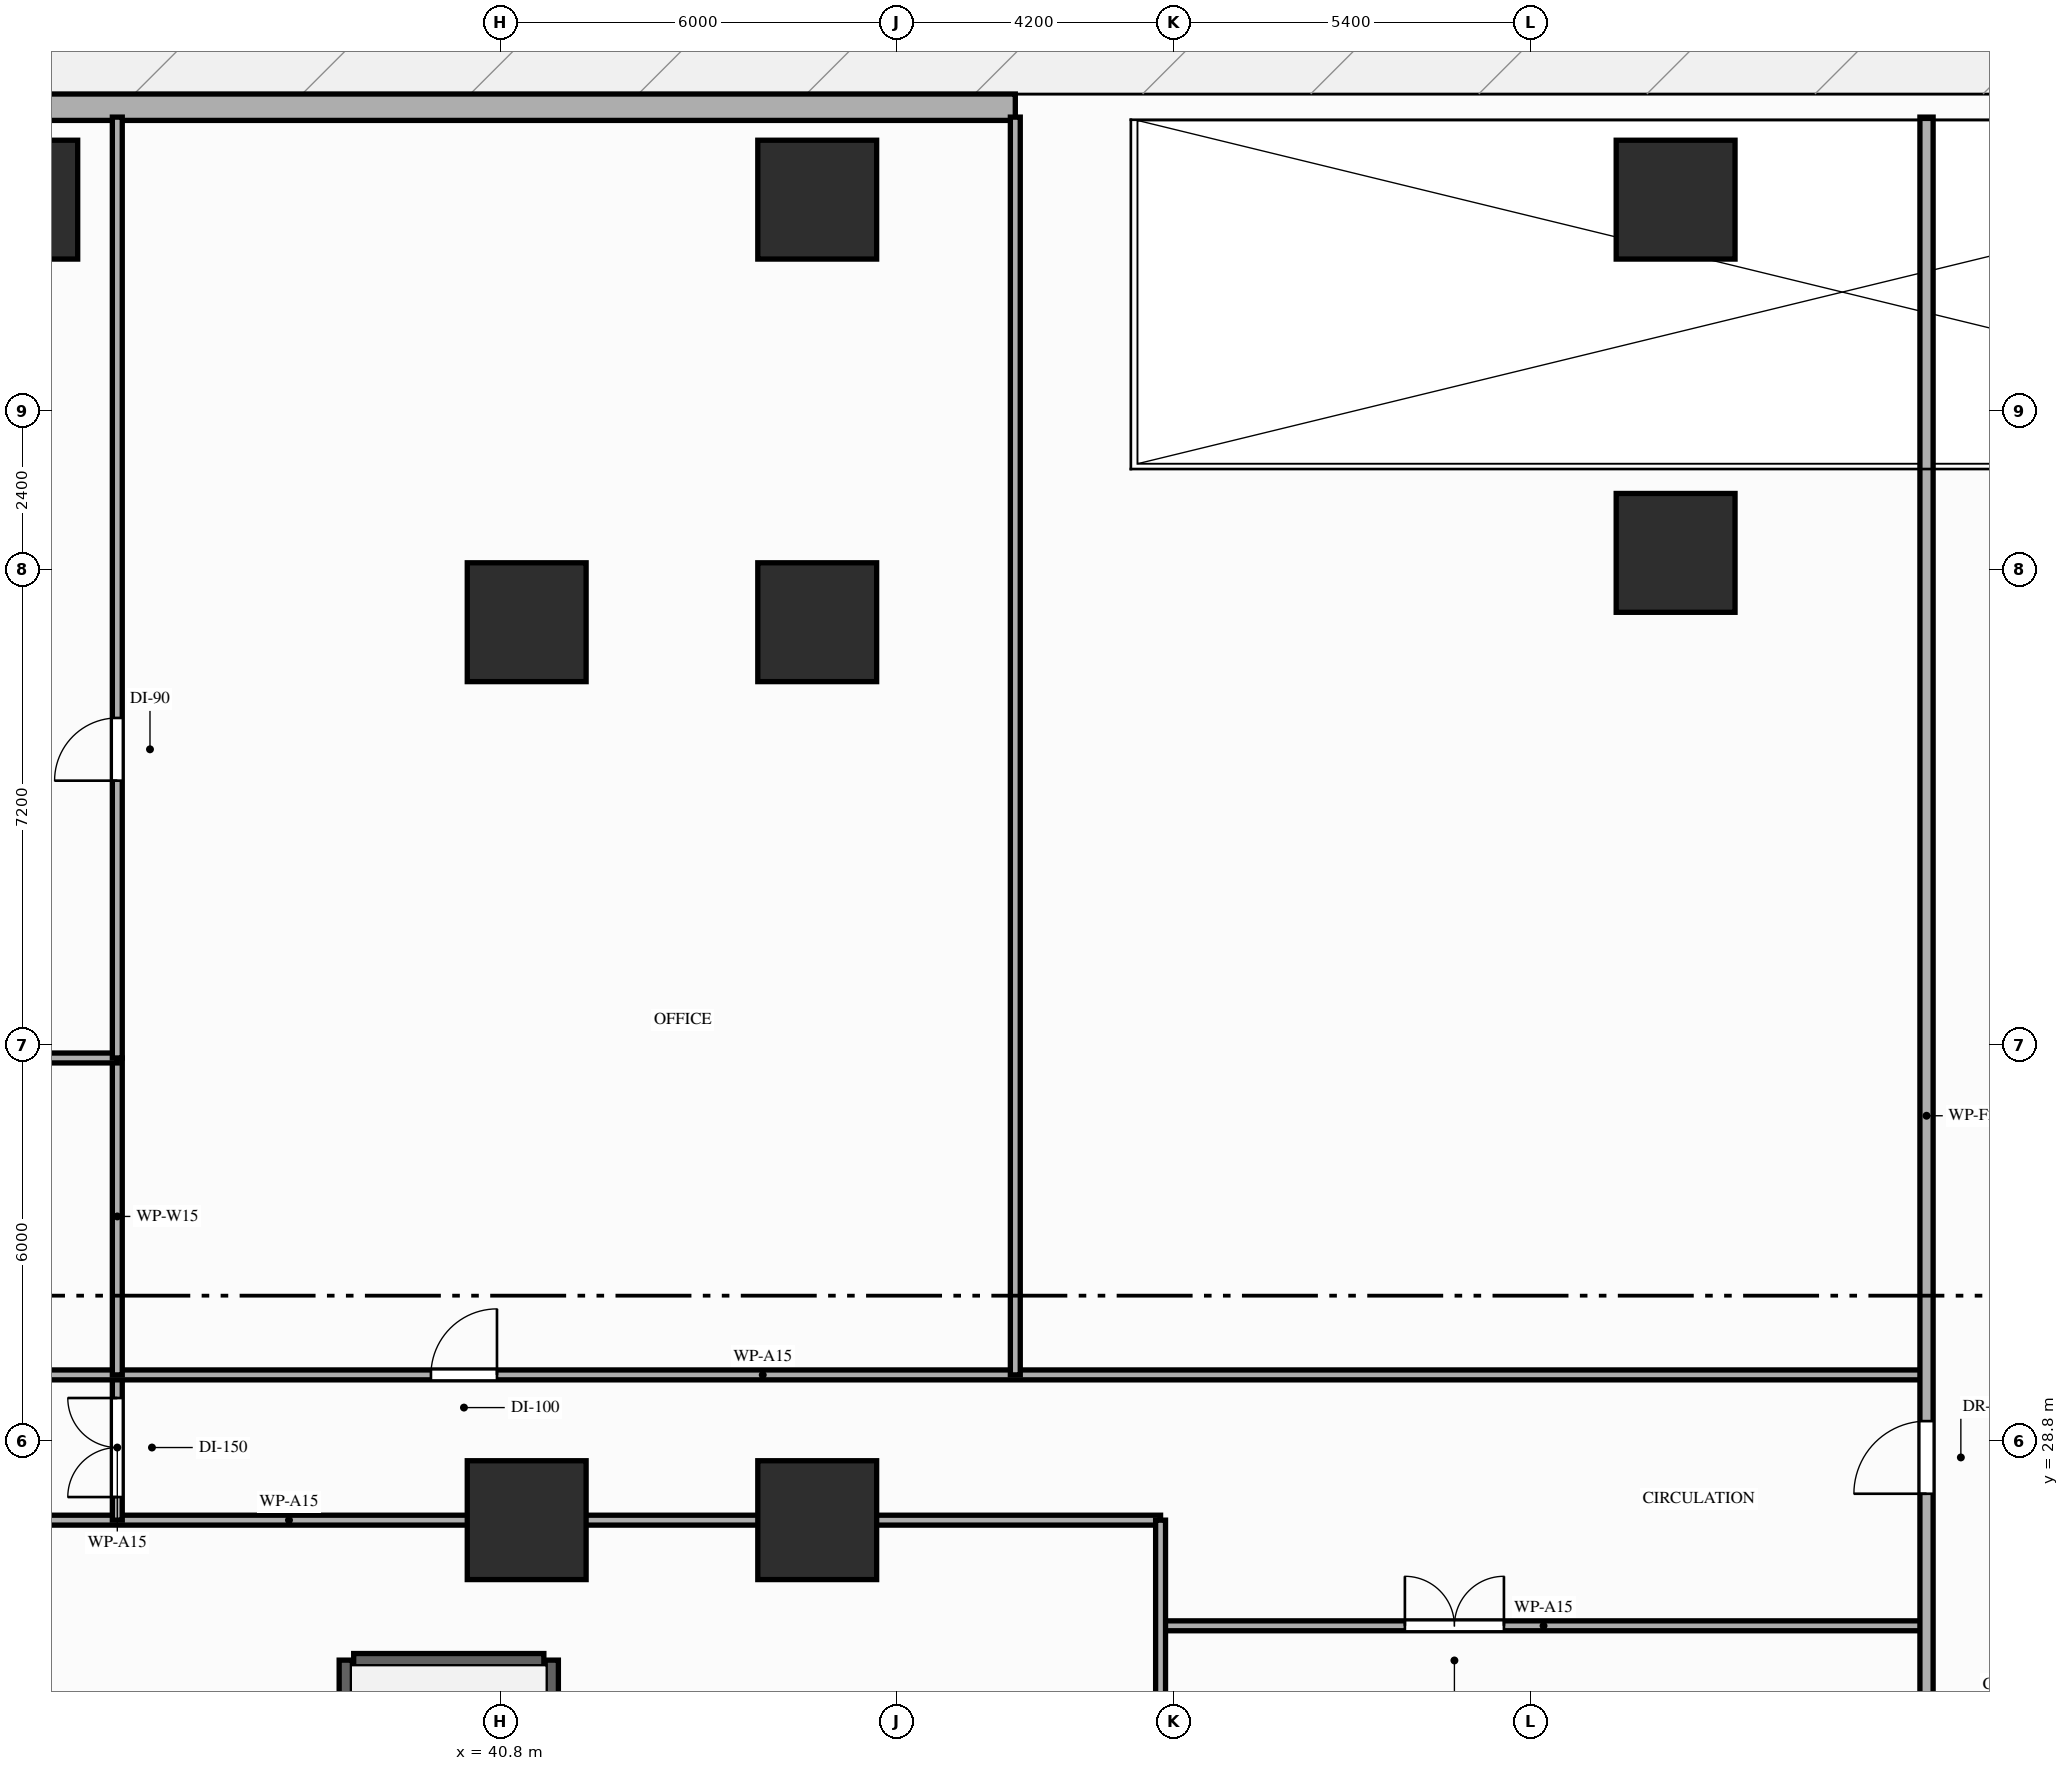
"""IFC4 building model, lengths in metres.
Left out: names, types, materials, properties, quantities, classifications, styles, units other than length and angle.
Written with IfcOpenShell. Run it as: python <this file> out.ifc"""

import sys

from ifc_helpers import new_model, si_unit, direction, frame, frame_2d, origin, origin_2d, place, context, subcontext, project, spatial, rectangle, extrude, element, fill, save


model = new_model("IFC4")
c1 = context("Model", 3, precision=1e-05, world=origin(), true_north=direction((0.0, 1.0)))
c2 = subcontext(c1, "Body", "Model", "MODEL_VIEW")
j1 = project(units=[si_unit("LENGTHUNIT", "METRE"), si_unit("PLANEANGLEUNIT", "RADIAN")], contexts=[c1])
p1 = place(None, origin())
s1 = spatial("IfcSite", under=j1, at=p1, CompositionType="ELEMENT")
p2 = place(p1, origin())
s2 = spatial("IfcBuilding", under=s1, at=p2, CompositionType="ELEMENT")
p3 = place(p2, origin())
s3 = spatial("IfcBuildingStorey", under=s2, at=p3, CompositionType="ELEMENT", Elevation=0.0)
for number, where, z_axis, x_axis in (
    (1, (41.2, 27.6, 0.0), (0.0, 0.0, 1.0), (1.0, 0.0, 0.0)),
    (2, (45.6, 27.6, 0.0), (0.0, 0.0, 1.0), (1.0, 0.0, 0.0)),
    (3, (41.2, 41.2, 0.0), (0.0, 0.0, 1.0), (1.0, 0.0, 0.0)),
    (4, (45.6, 41.2, 0.0), (0.0, 0.0, 1.0), (1.0, 0.0, 0.0)),
    (5, (58.6, 42.25, 0.0), (0.0, 0.0, 1.0), (1.0, 0.0, 0.0)),
    (6, (33.5, 47.6, 0.0), (0.0, 0.0, 1.0), (1.0, 0.0, 0.0)),
    (7, (45.6, 47.6, 0.0), (0.0, 0.0, 1.0), (1.0, 0.0, 0.0)),
    (8, (58.6, 47.6, 0.0), (0.0, 0.0, 1.0), (1.0, 0.0, 0.0)),
):
    element("IfcColumn", number, at=place(p3, frame(where, z_axis=z_axis, x_axis=x_axis)), inside=s3, PredefinedType="COLUMN", context=c2, shape_type="SweptSolid", body=[
        extrude(rectangle(XDim=1.8, YDim=1.8, at=origin_2d()), origin(), (0.0, 0.0, 1.0), 4.6),
    ])
p4 = place(p3, frame((48.6, 49.0, 0.0), z_axis=(0.0, 0.0, 1.0), x_axis=(-1.0, 0.0, 0.0)))
e9 = element("IfcWall", 9, at=p4, inside=s3, PredefinedType="STANDARD", context=c2, shape_type="SweptSolid", body=[
    extrude(rectangle(XDim=45.0, YDim=0.4, at=frame_2d((22.5, 0.0))), origin(), (0.0, 0.0, 1.0), 4.35),
])
p5 = place(p4, frame((18.8, 0.0, 0.9)))
e10 = element("IfcOpeningElement", 10, at=p5, cuts=e9, PredefinedType="OPENING", context=c2, shape_type="SweptSolid", body=[
    extrude(rectangle(XDim=2.4, YDim=2.15, at=frame_2d((1.2, 1.075))), frame((0.0, 0.21, 0.0), z_axis=(0.0, -1.0, 0.0), x_axis=(1.0, 0.0, 0.0)), (0.0, 0.0, 1.0), 0.42),
])
p6 = place(p4, frame((31.0, 0.0, 0.9)))
e11 = element("IfcOpeningElement", 11, at=p6, cuts=e9, PredefinedType="OPENING", context=c2, shape_type="SweptSolid", body=[
    extrude(rectangle(XDim=2.4, YDim=2.15, at=frame_2d((1.2, 1.075))), frame((0.0, 0.21, 0.0), z_axis=(0.0, -1.0, 0.0), x_axis=(1.0, 0.0, 0.0)), (0.0, 0.0, 1.0), 0.42),
])
p7 = place(p3, frame((38.46, 17.52, 0.0), z_axis=(0.0, 0.0, 1.0), x_axis=(0.0, 1.0, 0.0)))
e12 = element("IfcWall", 12, at=p7, inside=s3, PredefinedType="SHEAR", context=c2, shape_type="SweptSolid", body=[
    extrude(rectangle(XDim=7.96, YDim=0.2, at=frame_2d((3.98, 0.0))), origin(), (0.0, 0.0, 1.0), 4.35),
])
p8 = place(p3, frame((41.58, 17.52, 0.0), z_axis=(0.0, 0.0, 1.0), x_axis=(0.0, 1.0, 0.0)))
e13 = element("IfcWall", 13, at=p8, inside=s3, PredefinedType="SHEAR", context=c2, shape_type="SweptSolid", body=[
    extrude(rectangle(XDim=7.96, YDim=0.2, at=frame_2d((3.98, 0.0))), origin(), (0.0, 0.0, 1.0), 4.35),
])
p9 = place(p8, frame((0.22, 0.0, 0.0)))
e14 = element("IfcOpeningElement", 14, at=p9, cuts=e13, PredefinedType="OPENING", context=c2, shape_type="SweptSolid", body=[
    extrude(rectangle(XDim=1.1, YDim=2.15, at=frame_2d((0.55, 1.075))), frame((0.0, 0.11, 0.0), z_axis=(0.0, -1.0, 0.0), x_axis=(1.0, 0.0, 0.0)), (0.0, 0.0, 1.0), 0.22),
])
p10 = place(p3, frame((38.58, 25.48, 0.0), z_axis=(0.0, 0.0, 1.0), x_axis=(1.0, 0.0, 0.0)))
e15 = element("IfcWall", 15, at=p10, inside=s3, PredefinedType="SHEAR", context=c2, shape_type="SweptSolid", body=[
    extrude(rectangle(XDim=2.88, YDim=0.2, at=frame_2d((1.44, 0.0))), origin(), (0.0, 0.0, 1.0), 4.35),
])
p11 = place(p3, frame((24.4, 27.6, 0.0), z_axis=(0.0, 0.0, 1.0), x_axis=(1.0, 0.0, 0.0)))
e16 = element("IfcWall", 16, at=p11, inside=s3, PredefinedType="PARTITIONING", context=c2, shape_type="SweptSolid", body=[
    extrude(rectangle(XDim=26.4, YDim=0.15, at=frame_2d((13.2, 0.0))), origin(), (0.0, 0.0, 1.0), 3.63),
])
p12 = place(p11, frame((7.6, 0.0, 0.0)))
e17 = element("IfcOpeningElement", 17, at=p12, cuts=e16, PredefinedType="OPENING", context=c2, shape_type="SweptSolid", body=[
    extrude(rectangle(XDim=1.5, YDim=2.18, at=frame_2d((0.75, 1.09))), frame((0.0, 0.085, 0.0), z_axis=(0.0, -1.0, 0.0), x_axis=(1.0, 0.0, 0.0)), (0.0, 0.0, 1.0), 0.17),
])
p13 = place(p3, frame((50.8, 26.0, 0.0), z_axis=(0.0, 0.0, 1.0), x_axis=(1.0, 0.0, 0.0)))
e18 = element("IfcWall", 18, at=p13, inside=s3, PredefinedType="PARTITIONING", context=c2, shape_type="SweptSolid", body=[
    extrude(rectangle(XDim=11.6, YDim=0.15, at=frame_2d((5.8, 0.0))), origin(), (0.0, 0.0, 1.0), 3.63),
])
p14 = place(p13, frame((3.7, 0.0, 0.0)))
e19 = element("IfcOpeningElement", 19, at=p14, cuts=e18, PredefinedType="OPENING", context=c2, shape_type="SweptSolid", body=[
    extrude(rectangle(XDim=1.5, YDim=2.18, at=frame_2d((0.75, 1.09))), frame((0.0, 0.085, 0.0), z_axis=(0.0, -1.0, 0.0), x_axis=(1.0, 0.0, 0.0)), (0.0, 0.0, 1.0), 0.17),
])
p15 = place(p3, frame((35.0, 27.6, 0.0), z_axis=(0.0, 0.0, 1.0), x_axis=(0.0, 1.0, 0.0)))
e20 = element("IfcWall", 20, at=p15, inside=s3, PredefinedType="PARTITIONING", context=c2, shape_type="SweptSolid", body=[
    extrude(rectangle(XDim=2.2, YDim=0.15, at=frame_2d((1.1, 0.0))), origin(), (0.0, 0.0, 1.0), 3.63),
])
p16 = place(p15, frame((0.35, 0.0, 0.0)))
e21 = element("IfcOpeningElement", 21, at=p16, cuts=e20, PredefinedType="OPENING", context=c2, shape_type="SweptSolid", body=[
    extrude(rectangle(XDim=1.5, YDim=2.18, at=frame_2d((0.75, 1.09))), frame((0.0, 0.085, 0.0), z_axis=(0.0, -1.0, 0.0), x_axis=(1.0, 0.0, 0.0)), (0.0, 0.0, 1.0), 0.17),
])
p17 = place(p3, frame((27.15, 29.8, 0.0), z_axis=(0.0, 0.0, 1.0), x_axis=(1.0, 0.0, 0.0)))
e22 = element("IfcWall", 22, at=p17, inside=s3, PredefinedType="PARTITIONING", context=c2, shape_type="SweptSolid", body=[
    extrude(rectangle(XDim=35.25, YDim=0.15, at=frame_2d((17.625, 0.0))), origin(), (0.0, 0.0, 1.0), 3.63),
])
p18 = place(p17, frame((1.4, 0.0, 0.0)))
e23 = element("IfcOpeningElement", 23, at=p18, cuts=e22, PredefinedType="OPENING", context=c2, shape_type="SweptSolid", body=[
    extrude(rectangle(XDim=0.85, YDim=2.1, at=frame_2d((0.425, 1.05))), frame((0.0, 0.085, 0.0), z_axis=(0.0, -1.0, 0.0), x_axis=(1.0, 0.0, 0.0)), (0.0, 0.0, 1.0), 0.17),
])
p19 = place(p17, frame((5.4, 0.0, 0.0)))
e24 = element("IfcOpeningElement", 24, at=p19, cuts=e22, PredefinedType="OPENING", context=c2, shape_type="SweptSolid", body=[
    extrude(rectangle(XDim=0.95, YDim=2.1, at=frame_2d((0.475, 1.05))), frame((0.0, 0.085, 0.0), z_axis=(0.0, -1.0, 0.0), x_axis=(1.0, 0.0, 0.0)), (0.0, 0.0, 1.0), 0.17),
])
p20 = place(p17, frame((12.6, 0.0, 0.0)))
e25 = element("IfcOpeningElement", 25, at=p20, cuts=e22, PredefinedType="OPENING", context=c2, shape_type="SweptSolid", body=[
    extrude(rectangle(XDim=1.0, YDim=2.15, at=frame_2d((0.5, 1.075))), frame((0.0, 0.085, 0.0), z_axis=(0.0, -1.0, 0.0), x_axis=(1.0, 0.0, 0.0)), (0.0, 0.0, 1.0), 0.17),
])
p21 = place(p3, frame((50.8, 2.75, 0.0), z_axis=(0.0, 0.0, 1.0), x_axis=(0.0, 1.0, 0.0)))
e26 = element("IfcWall", 26, at=p21, inside=s3, PredefinedType="PARTITIONING", context=c2, shape_type="SweptSolid", body=[
    extrude(rectangle(XDim=24.85, YDim=0.15, at=frame_2d((12.425, 0.0))), origin(), (0.0, 0.0, 1.0), 3.43),
])
p22 = place(p3, frame((35.0, 29.8, 0.0), z_axis=(0.0, 0.0, 1.0), x_axis=(0.0, 1.0, 0.0)))
e27 = element("IfcWall", 27, at=p22, inside=s3, PredefinedType="PARTITIONING", context=c2, shape_type="SweptSolid", body=[
    extrude(rectangle(XDim=4.8, YDim=0.15, at=frame_2d((2.4, 0.0))), origin(), (0.0, 0.0, 1.0), 4.35),
])
p23 = place(p3, frame((27.15, 34.6, 0.0), z_axis=(0.0, 0.0, 1.0), x_axis=(1.0, 0.0, 0.0)))
e28 = element("IfcWall", 28, at=p23, inside=s3, PredefinedType="PARTITIONING", context=c2, shape_type="SweptSolid", body=[
    extrude(rectangle(XDim=7.85, YDim=0.15, at=frame_2d((3.925, 0.0))), origin(), (0.0, 0.0, 1.0), 3.63),
])
p24 = place(p3, frame((35.0, 34.6, 0.0), z_axis=(0.0, 0.0, 1.0), x_axis=(0.0, 1.0, 0.0)))
e29 = element("IfcWall", 29, at=p24, inside=s3, PredefinedType="PARTITIONING", context=c2, shape_type="SweptSolid", body=[
    extrude(rectangle(XDim=14.25, YDim=0.15, at=frame_2d((7.125, 0.0))), origin(), (0.0, 0.0, 1.0), 3.63),
])
p25 = place(p24, frame((4.2, 0.0, 0.0)))
e30 = element("IfcOpeningElement", 30, at=p25, cuts=e29, PredefinedType="OPENING", context=c2, shape_type="SweptSolid", body=[
    extrude(rectangle(XDim=0.95, YDim=2.15, at=frame_2d((0.475, 1.075))), frame((0.0, 0.085, 0.0), z_axis=(0.0, -1.0, 0.0), x_axis=(1.0, 0.0, 0.0)), (0.0, 0.0, 1.0), 0.17),
])
p26 = place(p3, frame((48.6, 29.8, 0.0), z_axis=(0.0, 0.0, 1.0), x_axis=(0.0, 1.0, 0.0)))
e31 = element("IfcWall", 31, at=p26, inside=s3, PredefinedType="PARTITIONING", context=c2, shape_type="SweptSolid", body=[
    extrude(rectangle(XDim=19.05, YDim=0.15, at=frame_2d((9.525, 0.0))), origin(), (0.0, 0.0, 1.0), 3.63),
])
p27 = place(p3, frame((62.4, 18.6, 0.0), z_axis=(0.0, 0.0, 1.0), x_axis=(0.0, 1.0, 0.0)))
e32 = element("IfcWall", 32, at=p27, inside=s3, PredefinedType="PARTITIONING", context=c2, shape_type="SweptSolid", body=[
    extrude(rectangle(XDim=30.25, YDim=0.2, at=frame_2d((15.125, 0.0))), origin(), (0.0, 0.0, 1.0), 3.63),
])
p28 = place(p27, frame((9.4, 0.0, 0.0)))
e33 = element("IfcOpeningElement", 33, at=p28, cuts=e32, PredefinedType="OPENING", context=c2, shape_type="SweptSolid", body=[
    extrude(rectangle(XDim=1.1, YDim=2.15, at=frame_2d((0.55, 1.075))), frame((0.0, 0.11, 0.0), z_axis=(0.0, -1.0, 0.0), x_axis=(1.0, 0.0, 0.0)), (0.0, 0.0, 1.0), 0.22),
])
p29 = place(p16, origin())
e34 = element("IfcDoor", 34, at=p29, inside=s3, OperationType="DOUBLE_DOOR_SINGLE_SWING", PredefinedType="DOOR", context=c2, shape_type="SweptSolid", body=[
    extrude(rectangle(XDim=1.5, YDim=2.18, at=frame_2d((0.75, 1.09))), frame((0.0, 0.025, 0.0), z_axis=(0.0, -1.0, 0.0), x_axis=(1.0, 0.0, 0.0)), (0.0, 0.0, 1.0), 0.05),
])
fill(e21, e34)
p30 = place(p14, origin())
e35 = element("IfcDoor", 35, at=p30, inside=s3, OperationType="DOUBLE_DOOR_SINGLE_SWING", PredefinedType="DOOR", context=c2, shape_type="SweptSolid", body=[
    extrude(rectangle(XDim=1.5, YDim=2.18, at=frame_2d((0.75, 1.09))), frame((0.0, 0.025, 0.0), z_axis=(0.0, -1.0, 0.0), x_axis=(1.0, 0.0, 0.0)), (0.0, 0.0, 1.0), 0.05),
])
fill(e19, e35)
p31 = place(p28, origin())
e36 = element("IfcDoor", 36, at=p31, inside=s3, OperationType="SINGLE_SWING_LEFT", PredefinedType="DOOR", context=c2, shape_type="SweptSolid", body=[
    extrude(rectangle(XDim=1.1, YDim=2.15, at=frame_2d((0.55, 1.075))), frame((0.0, 0.025, 0.0), z_axis=(0.0, -1.0, 0.0), x_axis=(1.0, 0.0, 0.0)), (0.0, 0.0, 1.0), 0.05),
])
fill(e33, e36)
p32 = place(p20, origin())
e37 = element("IfcDoor", 37, at=p32, inside=s3, OperationType="SINGLE_SWING_RIGHT", PredefinedType="DOOR", context=c2, shape_type="SweptSolid", body=[
    extrude(rectangle(XDim=1.0, YDim=2.15, at=frame_2d((0.5, 1.075))), frame((0.0, 0.025, 0.0), z_axis=(0.0, -1.0, 0.0), x_axis=(1.0, 0.0, 0.0)), (0.0, 0.0, 1.0), 0.05),
])
fill(e25, e37)
p33 = place(p25, origin())
e38 = element("IfcDoor", 38, at=p33, inside=s3, OperationType="SINGLE_SWING_LEFT", PredefinedType="DOOR", context=c2, shape_type="SweptSolid", body=[
    extrude(rectangle(XDim=0.95, YDim=2.15, at=frame_2d((0.475, 1.075))), frame((0.0, 0.025, 0.0), z_axis=(0.0, -1.0, 0.0), x_axis=(1.0, 0.0, 0.0)), (0.0, 0.0, 1.0), 0.05),
])
fill(e30, e38)
save(model, sys.argv[1])
